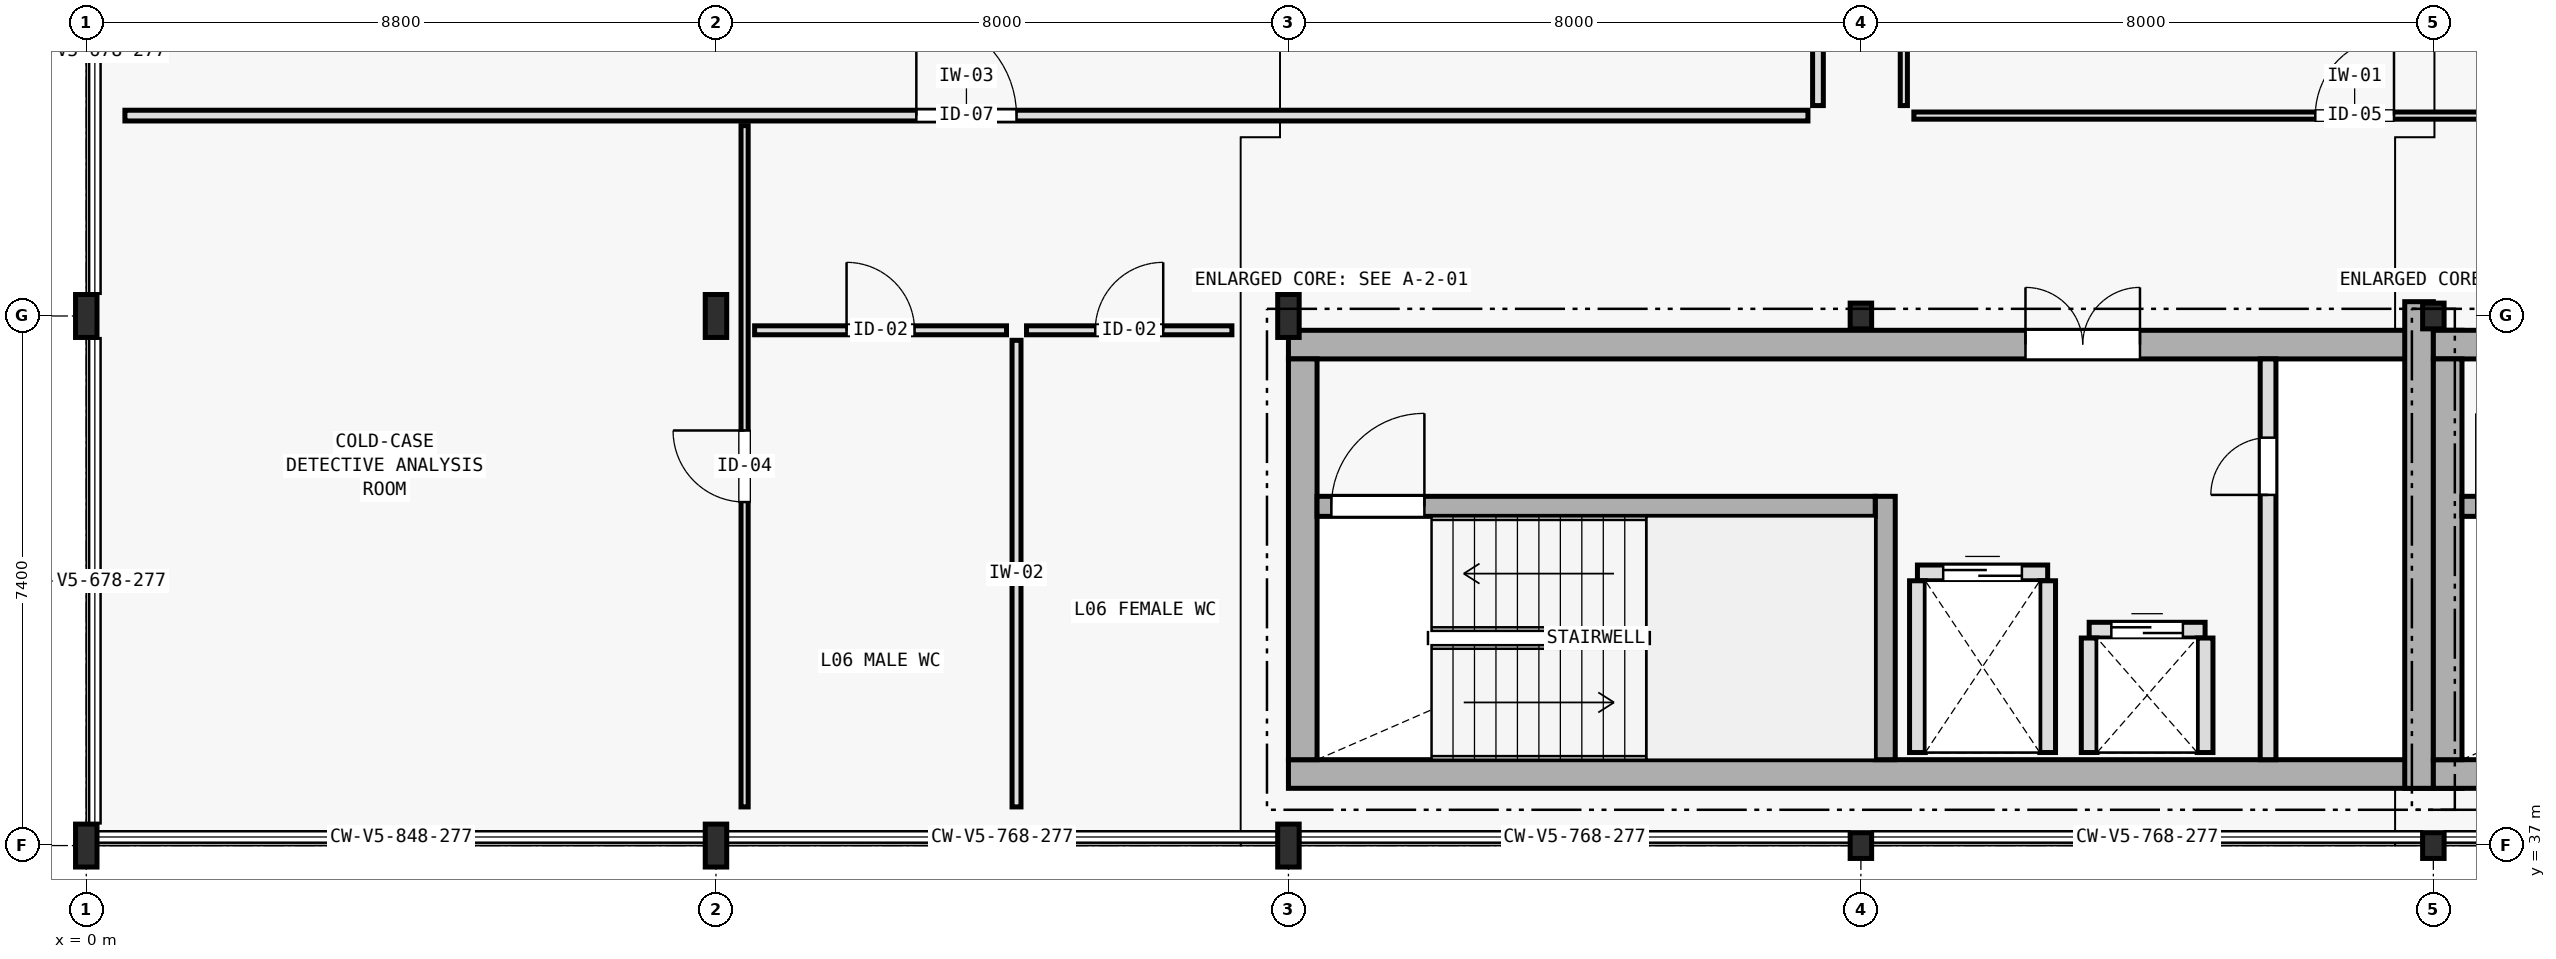
"""IFC4 building model, lengths in metres.
Left out: names, types, materials, properties, quantities, classifications, styles, units other than length and angle.
Written with IfcOpenShell. Run it as: python <this file> out.ifc"""

import sys

from ifc_helpers import new_model, si_unit, direction, frame, frame_2d, origin, origin_2d, place, context, subcontext, project, spatial, rectangle, i_section, extrude, element, fill, save


model = new_model("IFC4")
c1 = context("Model", 3, precision=1e-05, world=origin(), true_north=direction((0.0, 1.0)))
c2 = subcontext(c1, "Body", "Model", "MODEL_VIEW")
j1 = project(units=[si_unit("LENGTHUNIT", "METRE"), si_unit("PLANEANGLEUNIT", "RADIAN")], contexts=[c1])
p1 = place(None, origin())
s1 = spatial("IfcSite", under=j1, at=p1, CompositionType="ELEMENT")
p2 = place(p1, origin())
s2 = spatial("IfcBuilding", under=s1, at=p2, CompositionType="ELEMENT")
p3 = place(p2, frame((0.0, 0.0, 23.3)))
s3 = spatial("IfcBuildingStorey", under=s2, at=p3, CompositionType="ELEMENT", Elevation=23.3)
p4 = place(p3, frame((16.8, 38.0, 0.0), z_axis=(0.0, 0.0, 1.0), x_axis=(1.0, 0.0, 0.0)))
e1 = element("IfcWall", 1, at=p4, inside=s3, PredefinedType="SHEAR", context=c2, shape_type="SweptSolid", body=[
    extrude(rectangle(XDim=16.4, YDim=0.4, at=frame_2d((8.2, 0.0))), origin(), (0.0, 0.0, 1.0), 3.895),
])
p5 = place(p3, frame((16.8, 44.0, 0.0), z_axis=(0.0, 0.0, 1.0), x_axis=(1.0, 0.0, 0.0)))
e2 = element("IfcWall", 2, at=p5, inside=s3, PredefinedType="SHEAR", context=c2, shape_type="SweptSolid", body=[
    extrude(rectangle(XDim=16.4, YDim=0.4, at=frame_2d((8.2, 0.0))), origin(), (0.0, 0.0, 1.0), 3.895),
])
p6 = place(p5, frame((10.3, 0.0, 0.0)))
e3 = element("IfcOpeningElement", 3, at=p6, cuts=e2, PredefinedType="OPENING", context=c2, shape_type="SweptSolid", body=[
    extrude(rectangle(XDim=1.6, YDim=2.2, at=frame_2d((0.8, 1.1))), frame((0.0, 0.21, 0.0), z_axis=(0.0, -1.0, 0.0), x_axis=(1.0, 0.0, 0.0)), (0.0, 0.0, 1.0), 0.42),
])
p7 = place(p3, frame((17.0, 38.2, 0.0), z_axis=(0.0, 0.0, 1.0), x_axis=(0.0, 1.0, 0.0)))
e4 = element("IfcWall", 4, at=p7, inside=s3, PredefinedType="SHEAR", context=c2, shape_type="SweptSolid", body=[
    extrude(rectangle(XDim=5.6, YDim=0.4, at=frame_2d((2.8, 0.0))), origin(), (0.0, 0.0, 1.0), 3.895),
])
p8 = place(p3, frame((32.6, 37.8, 0.0), z_axis=(0.0, 0.0, 1.0), x_axis=(0.0, 1.0, 0.0)))
e5 = element("IfcWall", 5, at=p8, inside=s3, PredefinedType="SHEAR", context=c2, shape_type="SweptSolid", body=[
    extrude(rectangle(XDim=6.8, YDim=0.4, at=frame_2d((3.4, 0.0))), origin(), (0.0, 0.0, 1.0), 3.895),
])
p9 = place(p3, frame((25.14, 38.2, 0.0), z_axis=(0.0, 0.0, 1.0), x_axis=(0.0, 1.0, 0.0)))
e6 = element("IfcWall", 6, at=p9, inside=s3, PredefinedType="SHEAR", context=c2, shape_type="SweptSolid", body=[
    extrude(rectangle(XDim=3.68, YDim=0.28, at=frame_2d((1.84, 0.0))), origin(), (0.0, 0.0, 1.0), 3.895),
])
p10 = place(p3, frame((17.2, 41.74, 0.0), z_axis=(0.0, 0.0, 1.0), x_axis=(1.0, 0.0, 0.0)))
e7 = element("IfcWall", 7, at=p10, inside=s3, PredefinedType="SHEAR", context=c2, shape_type="SweptSolid", body=[
    extrude(rectangle(XDim=7.8, YDim=0.28, at=frame_2d((3.9, 0.0))), origin(), (0.0, 0.0, 1.0), 3.895),
])
p11 = place(p10, frame((0.2, 0.0, 0.0)))
e8 = element("IfcOpeningElement", 8, at=p11, cuts=e7, PredefinedType="OPENING", context=c2, shape_type="SweptSolid", body=[
    extrude(rectangle(XDim=1.3, YDim=2.2, at=frame_2d((0.65, 1.1))), frame((0.0, 0.15, 0.0), z_axis=(0.0, -1.0, 0.0), x_axis=(1.0, 0.0, 0.0)), (0.0, 0.0, 1.0), 0.3),
])
p12 = place(p3, frame((32.8, 38.0, 0.0), z_axis=(0.0, 0.0, 1.0), x_axis=(1.0, 0.0, 0.0)))
e9 = element("IfcWall", 9, at=p12, inside=s3, PredefinedType="SHEAR", context=c2, shape_type="SweptSolid", body=[
    extrude(rectangle(XDim=16.0, YDim=0.4, at=frame_2d((8.0, 0.0))), origin(), (0.0, 0.0, 1.0), 3.895),
])
p13 = place(p3, frame((32.8, 44.0, 0.0), z_axis=(0.0, 0.0, 1.0), x_axis=(1.0, 0.0, 0.0)))
e10 = element("IfcWall", 10, at=p13, inside=s3, PredefinedType="SHEAR", context=c2, shape_type="SweptSolid", body=[
    extrude(rectangle(XDim=16.0, YDim=0.4, at=frame_2d((8.0, 0.0))), origin(), (0.0, 0.0, 1.0), 3.895),
])
p14 = place(p13, frame((10.3, 0.0, 0.0)))
e11 = element("IfcOpeningElement", 11, at=p14, cuts=e10, PredefinedType="OPENING", context=c2, shape_type="SweptSolid", body=[
    extrude(rectangle(XDim=1.6, YDim=2.2, at=frame_2d((0.8, 1.1))), frame((0.0, 0.21, 0.0), z_axis=(0.0, -1.0, 0.0), x_axis=(1.0, 0.0, 0.0)), (0.0, 0.0, 1.0), 0.42),
])
p15 = place(p3, frame((33.0, 38.2, 0.0), z_axis=(0.0, 0.0, 1.0), x_axis=(0.0, 1.0, 0.0)))
e12 = element("IfcWall", 12, at=p15, inside=s3, PredefinedType="SHEAR", context=c2, shape_type="SweptSolid", body=[
    extrude(rectangle(XDim=5.6, YDim=0.4, at=frame_2d((2.8, 0.0))), origin(), (0.0, 0.0, 1.0), 3.895),
])
p16 = place(p3, frame((33.2, 41.74, 0.0), z_axis=(0.0, 0.0, 1.0), x_axis=(1.0, 0.0, 0.0)))
e13 = element("IfcWall", 13, at=p16, inside=s3, PredefinedType="SHEAR", context=c2, shape_type="SweptSolid", body=[
    extrude(rectangle(XDim=7.8, YDim=0.28, at=frame_2d((3.9, 0.0))), origin(), (0.0, 0.0, 1.0), 3.895),
])
p17 = place(p16, frame((0.2, 0.0, 0.0)))
e14 = element("IfcOpeningElement", 14, at=p17, cuts=e13, PredefinedType="OPENING", context=c2, shape_type="SweptSolid", body=[
    extrude(rectangle(XDim=1.3, YDim=2.2, at=frame_2d((0.65, 1.1))), frame((0.0, 0.15, 0.0), z_axis=(0.0, -1.0, 0.0), x_axis=(1.0, 0.0, 0.0)), (0.0, 0.0, 1.0), 0.3),
])
for number, where, z_axis, x_axis in (
    (15, (0.0, 37.0, 0.0), (0.0, 0.0, 1.0), (1.0, 0.0, 0.0)),
    (16, (0.0, 44.4, 0.0), (0.0, 0.0, 1.0), (1.0, 0.0, 0.0)),
    (17, (8.8, 37.0, 0.0), (0.0, 0.0, 1.0), (1.0, 0.0, 0.0)),
    (18, (8.8, 44.4, 0.0), (0.0, 0.0, 1.0), (1.0, 0.0, 0.0)),
    (19, (16.8, 37.0, 0.0), (0.0, 0.0, 1.0), (1.0, 0.0, 0.0)),
    (20, (16.8, 44.4, 0.0), (0.0, 0.0, 1.0), (1.0, 0.0, 0.0)),
):
    element("IfcColumn", number, at=place(p3, frame(where, z_axis=z_axis, x_axis=x_axis)), inside=s3, PredefinedType="COLUMN", context=c2, shape_type="SweptSolid", body=[
        extrude(i_section(OverallWidth=0.3, OverallDepth=0.6, WebThickness=0.015, FlangeThickness=0.03, FilletRadius=0.027, at=origin_2d()), origin(), (0.0, 0.0, 1.0), 3.9),
    ])
for number, where, z_axis, x_axis in (
    (21, (24.8, 37.0, 0.0), (0.0, 0.0, 1.0), (1.0, 0.0, 0.0)),
    (22, (24.8, 44.4, 0.0), (0.0, 0.0, 1.0), (1.0, 0.0, 0.0)),
    (23, (32.8, 37.0, 0.0), (0.0, 0.0, 1.0), (1.0, 0.0, 0.0)),
    (24, (32.8, 44.4, 0.0), (0.0, 0.0, 1.0), (1.0, 0.0, 0.0)),
):
    element("IfcColumn", number, at=place(p3, frame(where, z_axis=z_axis, x_axis=x_axis)), inside=s3, PredefinedType="COLUMN", context=c2, shape_type="SweptSolid", body=[
        extrude(i_section(OverallWidth=0.3, OverallDepth=0.36, WebThickness=0.012, FlangeThickness=0.022, FilletRadius=0.027, at=origin_2d()), origin(), (0.0, 0.0, 1.0), 3.9),
    ])
p18 = place(p3, frame((25.59, 40.81, 0.0), z_axis=(0.0, 0.0, 1.0), x_axis=(1.0, 0.0, 0.0)))
e25 = element("IfcWall", 25, at=p18, inside=s3, PredefinedType="PLUMBINGWALL", context=c2, shape_type="SweptSolid", body=[
    extrude(rectangle(XDim=1.82, YDim=0.22, at=frame_2d((0.91, 0.0))), origin(), (0.0, 0.0, 1.0), 3.68),
])
p19 = place(p18, frame((0.36, 0.0, 0.0)))
e26 = element("IfcOpeningElement", 26, at=p19, cuts=e25, PredefinedType="OPENING", context=c2, shape_type="SweptSolid", body=[
    extrude(rectangle(XDim=1.1, YDim=2.2, at=frame_2d((0.55, 1.1))), frame((0.0, 0.12, 0.0), z_axis=(0.0, -1.0, 0.0), x_axis=(1.0, 0.0, 0.0)), (0.0, 0.0, 1.0), 0.24),
])
for number, where, z_axis, x_axis in (
    (27, (25.59, 38.3, 0.0), (0.0, 0.0, 1.0), (0.0, 1.0, 0.0)),
    (28, (27.41, 38.3, 0.0), (0.0, 0.0, 1.0), (0.0, 1.0, 0.0)),
):
    element("IfcWall", number, at=place(p3, frame(where, z_axis=z_axis, x_axis=x_axis)), inside=s3, PredefinedType="PLUMBINGWALL", context=c2, shape_type="SweptSolid", body=[
        extrude(rectangle(XDim=2.4, YDim=0.22, at=frame_2d((1.2, 0.0))), origin(), (0.0, 0.0, 1.0), 3.68),
    ])
p20 = place(p3, frame((27.99, 40.01, 0.0), z_axis=(0.0, 0.0, 1.0), x_axis=(1.0, 0.0, 0.0)))
e29 = element("IfcWall", 29, at=p20, inside=s3, PredefinedType="PLUMBINGWALL", context=c2, shape_type="SweptSolid", body=[
    extrude(rectangle(XDim=1.62, YDim=0.22, at=frame_2d((0.81, 0.0))), origin(), (0.0, 0.0, 1.0), 3.68),
])
p21 = place(p20, frame((0.31, 0.0, 0.0)))
e30 = element("IfcOpeningElement", 30, at=p21, cuts=e29, PredefinedType="OPENING", context=c2, shape_type="SweptSolid", body=[
    extrude(rectangle(XDim=1.0, YDim=2.2, at=frame_2d((0.5, 1.1))), frame((0.0, 0.12, 0.0), z_axis=(0.0, -1.0, 0.0), x_axis=(1.0, 0.0, 0.0)), (0.0, 0.0, 1.0), 0.24),
])
for number, where, z_axis, x_axis in (
    (31, (27.99, 38.3, 0.0), (0.0, 0.0, 1.0), (0.0, 1.0, 0.0)),
    (32, (29.61, 38.3, 0.0), (0.0, 0.0, 1.0), (0.0, 1.0, 0.0)),
):
    element("IfcWall", number, at=place(p3, frame(where, z_axis=z_axis, x_axis=x_axis)), inside=s3, PredefinedType="PLUMBINGWALL", context=c2, shape_type="SweptSolid", body=[
        extrude(rectangle(XDim=1.6, YDim=0.22, at=frame_2d((0.8, 0.0))), origin(), (0.0, 0.0, 1.0), 3.68),
    ])
p22 = place(p3, frame((30.49, 38.2, 0.0), z_axis=(0.0, 0.0, 1.0), x_axis=(0.0, 1.0, 0.0)))
e33 = element("IfcWall", 33, at=p22, inside=s3, PredefinedType="PLUMBINGWALL", context=c2, shape_type="SweptSolid", body=[
    extrude(rectangle(XDim=5.6, YDim=0.22, at=frame_2d((2.8, 0.0))), origin(), (0.0, 0.0, 1.0), 3.68),
])
p23 = place(p22, frame((3.7, 0.0, 0.0)))
e34 = element("IfcOpeningElement", 34, at=p23, cuts=e33, PredefinedType="OPENING", context=c2, shape_type="SweptSolid", body=[
    extrude(rectangle(XDim=0.8, YDim=2.1, at=frame_2d((0.4, 1.05))), frame((0.0, 0.12, 0.0), z_axis=(0.0, -1.0, 0.0), x_axis=(1.0, 0.0, 0.0)), (0.0, 0.0, 1.0), 0.24),
])
p24 = place(p3, frame((0.54, 47.2, 0.0), z_axis=(0.0, 0.0, 1.0), x_axis=(1.0, 0.0, 0.0)))
e35 = element("IfcWall", 35, at=p24, inside=s3, PredefinedType="PARTITIONING", context=c2, shape_type="SweptSolid", body=[
    extrude(rectangle(XDim=23.52, YDim=0.15, at=frame_2d((11.76, 0.0))), origin(), (0.0, 0.0, 1.0), 3.21),
])
p25 = place(p24, frame((11.06, 0.0, 0.0)))
e36 = element("IfcOpeningElement", 36, at=p25, cuts=e35, PredefinedType="OPENING", context=c2, shape_type="SweptSolid", body=[
    extrude(rectangle(XDim=1.4, YDim=2.2, at=frame_2d((0.7, 1.1))), frame((0.0, 0.085, 0.0), z_axis=(0.0, -1.0, 0.0), x_axis=(1.0, 0.0, 0.0)), (0.0, 0.0, 1.0), 0.17),
])
p26 = place(p3, frame((24.2, 47.34, 0.0), z_axis=(0.0, 0.0, 1.0), x_axis=(0.0, 1.0, 0.0)))
e37 = element("IfcWall", 37, at=p26, inside=s3, PredefinedType="PARTITIONING", context=c2, shape_type="SweptSolid", body=[
    extrude(rectangle(XDim=11.32, YDim=0.15, at=frame_2d((5.66, 0.0))), origin(), (0.0, 0.0, 1.0), 2.76),
])
p27 = place(p3, frame((9.2, 37.54, 0.0), z_axis=(0.0, 0.0, 1.0), x_axis=(0.0, 1.0, 0.0)))
e38 = element("IfcWall", 38, at=p27, inside=s3, PredefinedType="PARTITIONING", context=c2, shape_type="SweptSolid", body=[
    extrude(rectangle(XDim=9.52, YDim=0.1, at=frame_2d((4.76, 0.0))), origin(), (0.0, 0.0, 1.0), 2.76),
])
p28 = place(p27, frame((4.26, 0.0, 0.0)))
e39 = element("IfcOpeningElement", 39, at=p28, cuts=e38, PredefinedType="OPENING", context=c2, shape_type="SweptSolid", body=[
    extrude(rectangle(XDim=1.0, YDim=2.2, at=frame_2d((0.5, 1.1))), frame((0.0, 0.06, 0.0), z_axis=(0.0, -1.0, 0.0), x_axis=(1.0, 0.0, 0.0)), (0.0, 0.0, 1.0), 0.12),
])
p29 = place(p3, frame((9.34, 44.2, 0.0), z_axis=(0.0, 0.0, 1.0), x_axis=(1.0, 0.0, 0.0)))
e40 = element("IfcWall", 40, at=p29, inside=s3, PredefinedType="PARTITIONING", context=c2, shape_type="SweptSolid", body=[
    extrude(rectangle(XDim=3.52, YDim=0.125, at=frame_2d((1.76, 0.0))), origin(), (0.0, 0.0, 1.0), 2.76),
])
p30 = place(p29, frame((1.285, 0.0, 0.0)))
e41 = element("IfcOpeningElement", 41, at=p30, cuts=e40, PredefinedType="OPENING", context=c2, shape_type="SweptSolid", body=[
    extrude(rectangle(XDim=0.95, YDim=2.1, at=frame_2d((0.475, 1.05))), frame((0.0, 0.073, 0.0), z_axis=(0.0, -1.0, 0.0), x_axis=(1.0, 0.0, 0.0)), (0.0, 0.0, 1.0), 0.145),
])
p31 = place(p3, frame((13.0, 37.54, 0.0), z_axis=(0.0, 0.0, 1.0), x_axis=(0.0, 1.0, 0.0)))
e42 = element("IfcWall", 42, at=p31, inside=s3, PredefinedType="PARTITIONING", context=c2, shape_type="SweptSolid", body=[
    extrude(rectangle(XDim=6.52, YDim=0.125, at=frame_2d((3.26, 0.0))), origin(), (0.0, 0.0, 1.0), 3.57),
])
p32 = place(p3, frame((13.14, 44.2, 0.0), z_axis=(0.0, 0.0, 1.0), x_axis=(1.0, 0.0, 0.0)))
e43 = element("IfcWall", 43, at=p32, inside=s3, PredefinedType="PARTITIONING", context=c2, shape_type="SweptSolid", body=[
    extrude(rectangle(XDim=2.87, YDim=0.125, at=frame_2d((1.435, 0.0))), origin(), (0.0, 0.0, 1.0), 2.76),
])
p33 = place(p32, frame((0.96, 0.0, 0.0)))
e44 = element("IfcOpeningElement", 44, at=p33, cuts=e43, PredefinedType="OPENING", context=c2, shape_type="SweptSolid", body=[
    extrude(rectangle(XDim=0.95, YDim=2.1, at=frame_2d((0.475, 1.05))), frame((0.0, 0.073, 0.0), z_axis=(0.0, -1.0, 0.0), x_axis=(1.0, 0.0, 0.0)), (0.0, 0.0, 1.0), 0.145),
])
p34 = place(p3, frame((25.54, 47.2, 0.0), z_axis=(0.0, 0.0, 1.0), x_axis=(1.0, 0.0, 0.0)))
e45 = element("IfcWall", 45, at=p34, inside=s3, PredefinedType="PARTITIONING", context=c2, shape_type="SweptSolid", body=[
    extrude(rectangle(XDim=12.32, YDim=0.1, at=frame_2d((6.16, 0.0))), origin(), (0.0, 0.0, 1.0), 3.21),
])
p35 = place(p34, frame((5.61, 0.0, 0.0)))
e46 = element("IfcOpeningElement", 46, at=p35, cuts=e45, PredefinedType="OPENING", context=c2, shape_type="SweptSolid", body=[
    extrude(rectangle(XDim=1.1, YDim=2.2, at=frame_2d((0.55, 1.1))), frame((0.0, 0.06, 0.0), z_axis=(0.0, -1.0, 0.0), x_axis=(1.0, 0.0, 0.0)), (0.0, 0.0, 1.0), 0.12),
])
p36 = place(p3, frame((25.4, 47.34, 0.0), z_axis=(0.0, 0.0, 1.0), x_axis=(0.0, 1.0, 0.0)))
e47 = element("IfcWall", 47, at=p36, inside=s3, PredefinedType="PARTITIONING", context=c2, shape_type="SweptSolid", body=[
    extrude(rectangle(XDim=11.32, YDim=0.1, at=frame_2d((5.66, 0.0))), origin(), (0.0, 0.0, 1.0), 3.21),
])
p37 = place(p11, origin())
e48 = element("IfcDoor", 48, at=p37, inside=s3, OperationType="SINGLE_SWING_RIGHT", PredefinedType="DOOR", context=c2, shape_type="SweptSolid", body=[
    extrude(rectangle(XDim=1.3, YDim=2.2, at=frame_2d((0.65, 1.1))), frame((0.0, 0.025, 0.0), z_axis=(0.0, -1.0, 0.0), x_axis=(1.0, 0.0, 0.0)), (0.0, 0.0, 1.0), 0.05),
])
fill(e8, e48)
p38 = place(p19, origin())
e49 = element("IfcDoor", 49, at=p38, inside=s3, OperationType="DOUBLE_DOOR_SLIDING", PredefinedType="DOOR", context=c2, shape_type="SweptSolid", body=[
    extrude(rectangle(XDim=1.1, YDim=2.2, at=frame_2d((0.55, 1.1))), frame((0.0, 0.025, 0.0), z_axis=(0.0, -1.0, 0.0), x_axis=(1.0, 0.0, 0.0)), (0.0, 0.0, 1.0), 0.05),
])
fill(e26, e49)
p39 = place(p21, origin())
e50 = element("IfcDoor", 50, at=p39, inside=s3, OperationType="DOUBLE_DOOR_SLIDING", PredefinedType="DOOR", context=c2, shape_type="SweptSolid", body=[
    extrude(rectangle(XDim=1.0, YDim=2.2, at=frame_2d((0.5, 1.1))), frame((0.0, 0.025, 0.0), z_axis=(0.0, -1.0, 0.0), x_axis=(1.0, 0.0, 0.0)), (0.0, 0.0, 1.0), 0.05),
])
fill(e30, e50)
p40 = place(p23, origin())
e51 = element("IfcDoor", 51, at=p40, inside=s3, OperationType="SINGLE_SWING_LEFT", PredefinedType="DOOR", context=c2, shape_type="SweptSolid", body=[
    extrude(rectangle(XDim=0.8, YDim=2.1, at=frame_2d((0.4, 1.05))), frame((0.0, 0.025, 0.0), z_axis=(0.0, -1.0, 0.0), x_axis=(1.0, 0.0, 0.0)), (0.0, 0.0, 1.0), 0.05),
])
fill(e34, e51)
p41 = place(p6, origin())
e52 = element("IfcDoor", 52, at=p41, inside=s3, OperationType="DOUBLE_DOOR_SINGLE_SWING", PredefinedType="DOOR", context=c2, shape_type="SweptSolid", body=[
    extrude(rectangle(XDim=1.6, YDim=2.2, at=frame_2d((0.8, 1.1))), frame((0.0, 0.025, 0.0), z_axis=(0.0, -1.0, 0.0), x_axis=(1.0, 0.0, 0.0)), (0.0, 0.0, 1.0), 0.05),
])
fill(e3, e52)
p42 = place(p17, origin())
e53 = element("IfcDoor", 53, at=p42, inside=s3, OperationType="SINGLE_SWING_LEFT", PredefinedType="DOOR", context=c2, shape_type="SweptSolid", body=[
    extrude(rectangle(XDim=1.3, YDim=2.2, at=frame_2d((0.65, 1.1))), frame((0.0, 0.025, 0.0), z_axis=(0.0, -1.0, 0.0), x_axis=(1.0, 0.0, 0.0)), (0.0, 0.0, 1.0), 0.05),
])
fill(e14, e53)
p43 = place(p25, origin())
e54 = element("IfcDoor", 54, at=p43, inside=s3, OperationType="SINGLE_SWING_LEFT", PredefinedType="DOOR", context=c2, shape_type="SweptSolid", body=[
    extrude(rectangle(XDim=1.4, YDim=2.2, at=frame_2d((0.7, 1.1))), frame((0.0, 0.025, 0.0), z_axis=(0.0, -1.0, 0.0), x_axis=(1.0, 0.0, 0.0)), (0.0, 0.0, 1.0), 0.05),
])
fill(e36, e54)
p44 = place(p28, origin())
e55 = element("IfcDoor", 55, at=p44, inside=s3, OperationType="SINGLE_SWING_RIGHT", PredefinedType="DOOR", context=c2, shape_type="SweptSolid", body=[
    extrude(rectangle(XDim=1.0, YDim=2.2, at=frame_2d((0.5, 1.1))), frame((0.0, 0.025, 0.0), z_axis=(0.0, -1.0, 0.0), x_axis=(1.0, 0.0, 0.0)), (0.0, 0.0, 1.0), 0.05),
])
fill(e39, e55)
p45 = place(p30, origin())
e56 = element("IfcDoor", 56, at=p45, inside=s3, OperationType="SINGLE_SWING_LEFT", PredefinedType="DOOR", context=c2, shape_type="SweptSolid", body=[
    extrude(rectangle(XDim=0.95, YDim=2.1, at=frame_2d((0.475, 1.05))), frame((0.0, 0.025, 0.0), z_axis=(0.0, -1.0, 0.0), x_axis=(1.0, 0.0, 0.0)), (0.0, 0.0, 1.0), 0.05),
])
fill(e41, e56)
p46 = place(p33, origin())
e57 = element("IfcDoor", 57, at=p46, inside=s3, OperationType="SINGLE_SWING_RIGHT", PredefinedType="DOOR", context=c2, shape_type="SweptSolid", body=[
    extrude(rectangle(XDim=0.95, YDim=2.1, at=frame_2d((0.475, 1.05))), frame((0.0, 0.025, 0.0), z_axis=(0.0, -1.0, 0.0), x_axis=(1.0, 0.0, 0.0)), (0.0, 0.0, 1.0), 0.05),
])
fill(e44, e57)
p47 = place(p35, origin())
e58 = element("IfcDoor", 58, at=p47, inside=s3, OperationType="SINGLE_SWING_RIGHT", PredefinedType="DOOR", context=c2, shape_type="SweptSolid", body=[
    extrude(rectangle(XDim=1.1, YDim=2.2, at=frame_2d((0.55, 1.1))), frame((0.0, 0.025, 0.0), z_axis=(0.0, -1.0, 0.0), x_axis=(1.0, 0.0, 0.0)), (0.0, 0.0, 1.0), 0.05),
])
fill(e46, e58)
save(model, sys.argv[1])
